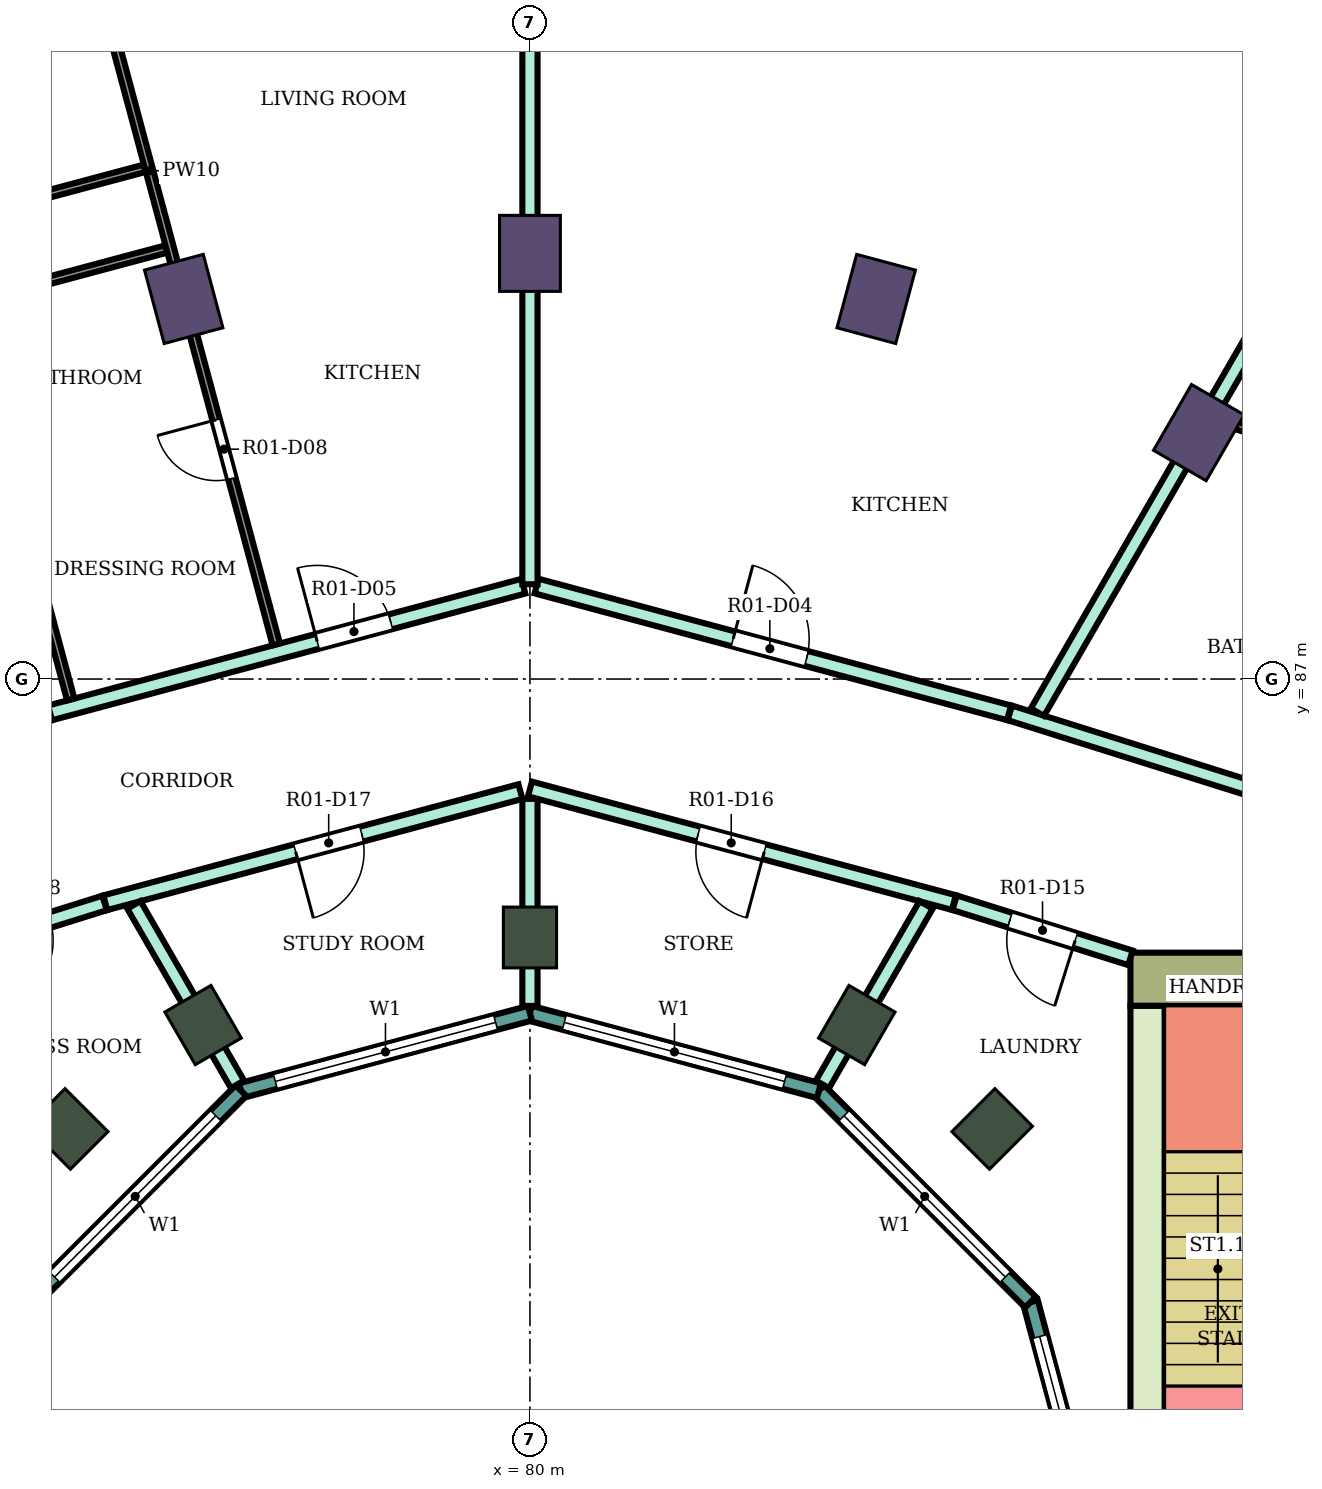
"""IFC4 building model, lengths in metres.
Left out: names, types, materials, properties, quantities, classifications, styles, units other than length and angle.
Written with IfcOpenShell. Run it as: python <this file> out.ifc"""

import sys

from ifc_helpers import new_model, si_unit, direction, frame, frame_2d, origin, origin_2d, place, context, subcontext, project, spatial, rectangle, extrude, element, fill, save


model = new_model("IFC4")
c1 = context("Model", 3, precision=1e-05, world=origin(), true_north=direction((0.0, 1.0)))
c2 = subcontext(c1, "Body", "Model", "MODEL_VIEW")
j1 = project(units=[si_unit("LENGTHUNIT", "METRE"), si_unit("PLANEANGLEUNIT", "RADIAN")], contexts=[c1])
p1 = place(None, origin())
s1 = spatial("IfcSite", under=j1, at=p1, CompositionType="ELEMENT")
p2 = place(p1, origin())
s2 = spatial("IfcBuilding", under=s1, at=p2, CompositionType="ELEMENT")
p3 = place(p2, frame((0.0, 0.0, 157.7)))
s3 = spatial("IfcBuildingStorey", under=s2, at=p3, CompositionType="ELEMENT", Elevation=157.7)
for number, where, z_axis, x_axis in (
    (1, (88.8, 90.242, 0.0), (0.0, 0.0, 1.0), (0.5, 0.866, 0.0)),
    (2, (84.555, 92.0, 0.0), (0.0, 0.0, 1.0), (0.259, 0.966, 0.0)),
    (3, (80.0, 92.6, 0.0), (0.0, 0.0, 1.0), (0.0, 1.0, 0.0)),
    (4, (75.445, 92.0, 0.0), (0.0, 0.0, 1.0), (-0.259, 0.966, 0.0)),
):
    element("IfcColumn", number, at=place(p3, frame(where, z_axis=z_axis, x_axis=x_axis)), inside=s3, PredefinedType="COLUMN", context=c2, shape_type="SweptSolid", body=[
        extrude(rectangle(XDim=1.0, YDim=0.8, at=origin_2d()), origin(), (0.0, 0.0, 1.0), 4.1),
    ])
for number, where, z_axis, x_axis in (
    (5, (86.081, 81.081, 0.0), (0.0, 0.0, 1.0), (0.707, 0.707, 0.0)),
    (6, (84.3, 82.448, 0.0), (0.0, 0.0, 1.0), (0.5, 0.866, 0.0)),
    (7, (80.0, 83.6, 0.0), (0.0, 0.0, 1.0), (0.0, 1.0, 0.0)),
    (8, (75.7, 82.448, 0.0), (0.0, 0.0, 1.0), (-0.5, 0.866, 0.0)),
    (9, (73.919, 81.081, 0.0), (0.0, 0.0, 1.0), (-0.707, 0.707, 0.0)),
):
    element("IfcColumn", number, at=place(p3, frame(where, z_axis=z_axis, x_axis=x_axis)), inside=s3, PredefinedType="COLUMN", context=c2, shape_type="SweptSolid", body=[
        extrude(rectangle(XDim=0.8, YDim=0.7, at=origin_2d()), origin(), (0.0, 0.0, 1.0), 4.1),
    ])
p4 = place(p3, frame((87.9, 83.05, 0.0), z_axis=(0.0, 0.0, 1.0), x_axis=(1.0, 0.0, 0.0)))
e10 = element("IfcWall", 10, at=p4, inside=s3, PredefinedType="SHEAR", context=c2, shape_type="SweptSolid", body=[
    extrude(rectangle(XDim=14.8, YDim=0.7, at=frame_2d((7.4, 0.0))), origin(), (0.0, 0.0, 1.0), 3.78),
])
p5 = place(p4, frame((4.2, 0.0, 0.0)))
e11 = element("IfcOpeningElement", 11, at=p5, cuts=e10, PredefinedType="OPENING", context=c2, shape_type="SweptSolid", body=[
    extrude(rectangle(XDim=2.4, YDim=2.4, at=frame_2d((1.2, 1.2))), frame((0.0, 0.36, 0.0), z_axis=(0.0, -1.0, 0.0), x_axis=(1.0, 0.0, 0.0)), (0.0, 0.0, 1.0), 0.72),
])
p6 = place(p3, frame((88.125, 75.0, 0.0), z_axis=(0.0, 0.0, 1.0), x_axis=(0.0, 1.0, 0.0)))
e12 = element("IfcWall", 12, at=p6, inside=s3, PredefinedType="SHEAR", context=c2, shape_type="SweptSolid", body=[
    extrude(rectangle(XDim=7.7, YDim=0.45, at=frame_2d((3.85, 0.0))), origin(), (0.0, 0.0, 1.0), 3.78),
])
p7 = place(p3, frame((87.604, 75.0, 0.0), z_axis=(0.0, 0.0, 1.0), x_axis=(-0.258789828301, 0.965933654434, 0.0)))
e13 = element("IfcWall", 13, at=p7, inside=s3, PredefinedType="NOTDEFINED", context=c2, shape_type="SweptSolid", body=[
    extrude(rectangle(XDim=3.936, YDim=0.2, at=frame_2d((1.968, 0.0))), origin(), (0.0, 0.0, 1.0), 4.1),
])
p8 = place(p7, frame((0.468, 0.0, 0.9)))
e14 = element("IfcOpeningElement", 14, at=p8, cuts=e13, PredefinedType="OPENING", context=c2, shape_type="SweptSolid", body=[
    extrude(rectangle(XDim=3.0, YDim=2.3, at=frame_2d((1.5, 1.15))), frame((0.0, 0.11, 0.0), z_axis=(0.0, -1.0, 0.0), x_axis=(1.0, 0.0, 0.0)), (0.0, 0.0, 1.0), 0.22),
])
p9 = place(p3, frame((86.585, 78.802, 0.0), z_axis=(0.0, 0.0, 1.0), x_axis=(-0.707106781187, 0.707106781187, 0.0)))
e15 = element("IfcWall", 15, at=p9, inside=s3, PredefinedType="NOTDEFINED", context=c2, shape_type="SweptSolid", body=[
    extrude(rectangle(XDim=3.936, YDim=0.2, at=frame_2d((1.968, 0.0))), origin(), (0.0, 0.0, 1.0), 4.1),
])
p10 = place(p9, frame((0.468, 0.0, 0.9)))
e16 = element("IfcOpeningElement", 16, at=p10, cuts=e15, PredefinedType="OPENING", context=c2, shape_type="SweptSolid", body=[
    extrude(rectangle(XDim=3.0, YDim=2.3, at=frame_2d((1.5, 1.15))), frame((0.0, 0.11, 0.0), z_axis=(0.0, -1.0, 0.0), x_axis=(1.0, 0.0, 0.0)), (0.0, 0.0, 1.0), 0.22),
])
p11 = place(p3, frame((83.802, 81.585, 0.0), z_axis=(0.0, 0.0, 1.0), x_axis=(-0.965933654434, 0.258789828301, 0.0)))
e17 = element("IfcWall", 17, at=p11, inside=s3, PredefinedType="NOTDEFINED", context=c2, shape_type="SweptSolid", body=[
    extrude(rectangle(XDim=3.936, YDim=0.2, at=frame_2d((1.968, 0.0))), origin(), (0.0, 0.0, 1.0), 4.1),
])
p12 = place(p11, frame((0.468, 0.0, 0.9)))
e18 = element("IfcOpeningElement", 18, at=p12, cuts=e17, PredefinedType="OPENING", context=c2, shape_type="SweptSolid", body=[
    extrude(rectangle(XDim=3.0, YDim=2.3, at=frame_2d((1.5, 1.15))), frame((0.0, 0.11, 0.0), z_axis=(0.0, -1.0, 0.0), x_axis=(1.0, 0.0, 0.0)), (0.0, 0.0, 1.0), 0.22),
])
p13 = place(p3, frame((80.0, 82.604, 0.0), z_axis=(0.0, 0.0, 1.0), x_axis=(-0.965933654434, -0.258789828301, 0.0)))
e19 = element("IfcWall", 19, at=p13, inside=s3, PredefinedType="NOTDEFINED", context=c2, shape_type="SweptSolid", body=[
    extrude(rectangle(XDim=3.936, YDim=0.2, at=frame_2d((1.968, 0.0))), origin(), (0.0, 0.0, 1.0), 4.1),
])
p14 = place(p13, frame((0.468, 0.0, 0.9)))
e20 = element("IfcOpeningElement", 20, at=p14, cuts=e19, PredefinedType="OPENING", context=c2, shape_type="SweptSolid", body=[
    extrude(rectangle(XDim=3.0, YDim=2.3, at=frame_2d((1.5, 1.15))), frame((0.0, 0.11, 0.0), z_axis=(0.0, -1.0, 0.0), x_axis=(1.0, 0.0, 0.0)), (0.0, 0.0, 1.0), 0.22),
])
p15 = place(p3, frame((76.198, 81.585, 0.0), z_axis=(0.0, 0.0, 1.0), x_axis=(-0.707106781187, -0.707106781187, 0.0)))
e21 = element("IfcWall", 21, at=p15, inside=s3, PredefinedType="NOTDEFINED", context=c2, shape_type="SweptSolid", body=[
    extrude(rectangle(XDim=3.936, YDim=0.2, at=frame_2d((1.968, 0.0))), origin(), (0.0, 0.0, 1.0), 4.1),
])
p16 = place(p15, frame((0.468, 0.0, 0.9)))
e22 = element("IfcOpeningElement", 22, at=p16, cuts=e21, PredefinedType="OPENING", context=c2, shape_type="SweptSolid", body=[
    extrude(rectangle(XDim=3.0, YDim=2.3, at=frame_2d((1.5, 1.15))), frame((0.0, 0.11, 0.0), z_axis=(0.0, -1.0, 0.0), x_axis=(1.0, 0.0, 0.0)), (0.0, 0.0, 1.0), 0.22),
])
p17 = place(p3, frame((72.1, 83.332, 0.0), z_axis=(0.0, 0.0, 1.0), x_axis=(0.954233106619, 0.299063836383, 0.0)))
e23 = element("IfcWall", 23, at=p17, inside=s3, PredefinedType="PARTITIONING", context=c2, shape_type="SweptSolid", body=[
    extrude(rectangle(XDim=2.414, YDim=0.2, at=frame_2d((1.207, 0.0))), origin(), (0.0, 0.0, 1.0), 3.65),
])
p18 = place(p17, frame((0.762, 0.0, 0.0)))
e24 = element("IfcOpeningElement", 24, at=p18, cuts=e23, PredefinedType="OPENING", context=c2, shape_type="SweptSolid", body=[
    extrude(rectangle(XDim=0.9, YDim=2.1, at=frame_2d((0.45, 1.05))), frame((0.0, 0.11, 0.0), z_axis=(0.0, -1.0, 0.0), x_axis=(1.0, 0.0, 0.0)), (0.0, 0.0, 1.0), 0.22),
])
p19 = place(p3, frame((73.687, 86.554, 0.0), z_axis=(0.0, 0.0, 1.0), x_axis=(0.965999420828, 0.258544230182, 0.0)))
e25 = element("IfcWall", 25, at=p19, inside=s3, PredefinedType="PARTITIONING", context=c2, shape_type="SweptSolid", body=[
    extrude(rectangle(XDim=6.446, YDim=0.2, at=frame_2d((3.223, 0.0))), origin(), (0.0, 0.0, 1.0), 3.65),
])
p20 = place(p19, frame((3.638, 0.0, 0.0)))
e26 = element("IfcOpeningElement", 26, at=p20, cuts=e25, PredefinedType="OPENING", context=c2, shape_type="SweptSolid", body=[
    extrude(rectangle(XDim=1.0, YDim=2.1, at=frame_2d((0.5, 1.05))), frame((0.0, 0.11, 0.0), z_axis=(0.0, -1.0, 0.0), x_axis=(1.0, 0.0, 0.0)), (0.0, 0.0, 1.0), 0.22),
])
p21 = place(p3, frame((74.413, 84.057, 0.0), z_axis=(0.0, 0.0, 1.0), x_axis=(0.965972135939, 0.258646153246, 0.0)))
e27 = element("IfcWall", 27, at=p21, inside=s3, PredefinedType="PARTITIONING", context=c2, shape_type="SweptSolid", body=[
    extrude(rectangle(XDim=5.654, YDim=0.2, at=frame_2d((2.827, 0.0))), origin(), (0.0, 0.0, 1.0), 3.65),
])
p22 = place(p21, frame((2.593, 0.0, 0.0)))
e28 = element("IfcOpeningElement", 28, at=p22, cuts=e27, PredefinedType="OPENING", context=c2, shape_type="SweptSolid", body=[
    extrude(rectangle(XDim=0.9, YDim=2.1, at=frame_2d((0.45, 1.05))), frame((0.0, 0.11, 0.0), z_axis=(0.0, -1.0, 0.0), x_axis=(1.0, 0.0, 0.0)), (0.0, 0.0, 1.0), 0.22),
])
p23 = place(p3, frame((74.79, 84.028, 0.0), z_axis=(0.0, 0.0, 1.0), x_axis=(0.499905962189, -0.866079689733, 0.0)))
e29 = element("IfcWall", 29, at=p23, inside=s3, PredefinedType="PARTITIONING", context=c2, shape_type="SweptSolid", body=[
    extrude(rectangle(XDim=2.726, YDim=0.2, at=frame_2d((1.363, 0.0))), origin(), (0.0, 0.0, 1.0), 3.65),
])
p24 = place(p3, frame((80.0, 82.699, 0.0), z_axis=(0.0, 0.0, 1.0), x_axis=(0.0, 1.0, 0.0)))
e30 = element("IfcWall", 30, at=p24, inside=s3, PredefinedType="PARTITIONING", context=c2, shape_type="SweptSolid", body=[
    extrude(rectangle(XDim=2.725, YDim=0.2, at=frame_2d((1.363, 0.0))), origin(), (0.0, 0.0, 1.0), 3.65),
])
p25 = place(p3, frame((80.0, 85.554, 0.0), z_axis=(0.0, 0.0, 1.0), x_axis=(0.965928989968, -0.258807237802, 0.0)))
e31 = element("IfcWall", 31, at=p25, inside=s3, PredefinedType="PARTITIONING", context=c2, shape_type="SweptSolid", body=[
    extrude(rectangle(XDim=5.774, YDim=0.2, at=frame_2d((2.887, 0.0))), origin(), (0.0, 0.0, 1.0), 3.65),
])
p26 = place(p25, frame((2.292, 0.0, 0.0)))
e32 = element("IfcOpeningElement", 32, at=p26, cuts=e31, PredefinedType="OPENING", context=c2, shape_type="SweptSolid", body=[
    extrude(rectangle(XDim=0.9, YDim=2.1, at=frame_2d((0.45, 1.05))), frame((0.0, 0.11, 0.0), z_axis=(0.0, -1.0, 0.0), x_axis=(1.0, 0.0, 0.0)), (0.0, 0.0, 1.0), 0.22),
])
p27 = place(p3, frame((80.087, 88.223, 0.0), z_axis=(0.0, 0.0, 1.0), x_axis=(0.965852330757, -0.25909317855, 0.0)))
e33 = element("IfcWall", 33, at=p27, inside=s3, PredefinedType="PARTITIONING", context=c2, shape_type="SweptSolid", body=[
    extrude(rectangle(XDim=6.436, YDim=0.2, at=frame_2d((3.218, 0.0))), origin(), (0.0, 0.0, 1.0), 3.65),
])
p28 = place(p27, frame((2.678, 0.0, 0.0)))
e34 = element("IfcOpeningElement", 34, at=p28, cuts=e33, PredefinedType="OPENING", context=c2, shape_type="SweptSolid", body=[
    extrude(rectangle(XDim=1.0, YDim=2.1, at=frame_2d((0.5, 1.05))), frame((0.0, 0.11, 0.0), z_axis=(0.0, -1.0, 0.0), x_axis=(1.0, 0.0, 0.0)), (0.0, 0.0, 1.0), 0.22),
])
p29 = place(p3, frame((80.0, 88.247, 0.0), z_axis=(0.0, 0.0, 1.0), x_axis=(0.0, 1.0, 0.0)))
e35 = element("IfcWall", 35, at=p29, inside=s3, PredefinedType="PARTITIONING", context=c2, shape_type="SweptSolid", body=[
    extrude(rectangle(XDim=9.952, YDim=0.2, at=frame_2d((4.976, 0.0))), origin(), (0.0, 0.0, 1.0), 3.65),
])
p30 = place(p3, frame((83.848, 81.667, 0.0), z_axis=(0.0, 0.0, 1.0), x_axis=(0.500185068774, 0.865918527909, 0.0)))
e36 = element("IfcWall", 36, at=p30, inside=s3, PredefinedType="PARTITIONING", context=c2, shape_type="SweptSolid", body=[
    extrude(rectangle(XDim=2.726, YDim=0.2, at=frame_2d((1.363, 0.0))), origin(), (0.0, 0.0, 1.0), 3.65),
])
p31 = place(p3, frame((85.587, 84.057, 0.0), z_axis=(0.0, 0.0, 1.0), x_axis=(0.954239513179, -0.299043393987, 0.0)))
e37 = element("IfcWall", 37, at=p31, inside=s3, PredefinedType="PARTITIONING", context=c2, shape_type="SweptSolid", body=[
    extrude(rectangle(XDim=2.424, YDim=0.2, at=frame_2d((1.212, 0.0))), origin(), (0.0, 0.0, 1.0), 3.65),
])
p32 = place(p31, frame((0.762, 0.0, 0.0)))
e38 = element("IfcOpeningElement", 38, at=p32, cuts=e37, PredefinedType="OPENING", context=c2, shape_type="SweptSolid", body=[
    extrude(rectangle(XDim=0.9, YDim=2.1, at=frame_2d((0.45, 1.05))), frame((0.0, 0.11, 0.0), z_axis=(0.0, -1.0, 0.0), x_axis=(1.0, 0.0, 0.0)), (0.0, 0.0, 1.0), 0.22),
])
p33 = place(p3, frame((86.313, 86.555, 0.0), z_axis=(0.0, 0.0, 1.0), x_axis=(0.953919398959, -0.300062960544, 0.0)))
e39 = element("IfcWall", 39, at=p33, inside=s3, PredefinedType="PARTITIONING", context=c2, shape_type="SweptSolid", body=[
    extrude(rectangle(XDim=5.721, YDim=0.2, at=frame_2d((2.86, 0.0))), origin(), (0.0, 0.0, 1.0), 3.65),
])
p34 = place(p3, frame((86.677, 86.564, 0.0), z_axis=(0.0, 0.0, 1.0), x_axis=(0.500120377296, 0.865955892764, 0.0)))
e40 = element("IfcWall", 40, at=p34, inside=s3, PredefinedType="PARTITIONING", context=c2, shape_type="SweptSolid", body=[
    extrude(rectangle(XDim=12.445, YDim=0.2, at=frame_2d((6.222, 0.0))), origin(), (0.0, 0.0, 1.0), 3.65),
])
p35 = place(p3, frame((70.019, 92.405, 0.0), z_axis=(0.0, 0.0, 1.0), x_axis=(0.965982744428, 0.258606530209, 0.0)))
e41 = element("IfcWall", 41, at=p35, inside=s3, PredefinedType="PARTITIONING", context=c2, shape_type="SweptSolid", body=[
    extrude(rectangle(XDim=5.087, YDim=0.1, at=frame_2d((2.543, 0.0))), origin(), (0.0, 0.0, 1.0), 3.65),
])
p36 = place(p35, frame((2.438, 0.0, 0.0)))
e42 = element("IfcOpeningElement", 42, at=p36, cuts=e41, PredefinedType="OPENING", context=c2, shape_type="SweptSolid", body=[
    extrude(rectangle(XDim=0.8, YDim=2.1, at=frame_2d((0.4, 1.05))), frame((0.0, 0.06, 0.0), z_axis=(0.0, -1.0, 0.0), x_axis=(1.0, 0.0, 0.0)), (0.0, 0.0, 1.0), 0.12),
])
p37 = place(p3, frame((72.574, 91.898, 0.0), z_axis=(0.0, 0.0, 1.0), x_axis=(0.258739127054, -0.965947236722, 0.0)))
e43 = element("IfcWall", 43, at=p37, inside=s3, PredefinedType="PARTITIONING", context=c2, shape_type="SweptSolid", body=[
    extrude(rectangle(XDim=5.349, YDim=0.1, at=frame_2d((2.675, 0.0))), origin(), (0.0, 0.0, 1.0), 3.65),
])
p38 = place(p3, frame((72.561, 91.946, 0.0), z_axis=(0.0, 0.0, 1.0), x_axis=(0.96591000446, 0.258878085754, 0.0)))
e44 = element("IfcWall", 44, at=p38, inside=s3, PredefinedType="PARTITIONING", context=c2, shape_type="SweptSolid", body=[
    extrude(rectangle(XDim=2.75, YDim=0.1, at=frame_2d((1.375, 0.0))), origin(), (0.0, 0.0, 1.0), 3.65),
])
p39 = place(p3, frame((73.324, 99.92, 0.0), z_axis=(0.0, 0.0, 1.0), x_axis=(0.258710550884, -0.965954890697, 0.0)))
e45 = element("IfcWall", 45, at=p39, inside=s3, PredefinedType="PARTITIONING", context=c2, shape_type="SweptSolid", body=[
    extrude(rectangle(XDim=12.904, YDim=0.1, at=frame_2d((6.452, 0.0))), origin(), (0.0, 0.0, 1.0), 3.65),
])
p40 = place(p39, frame((2.787, 0.0, 0.0)))
e46 = element("IfcOpeningElement", 46, at=p40, cuts=e45, PredefinedType="OPENING", context=c2, shape_type="SweptSolid", body=[
    extrude(rectangle(XDim=0.9, YDim=2.1, at=frame_2d((0.45, 1.05))), frame((0.0, 0.06, 0.0), z_axis=(0.0, -1.0, 0.0), x_axis=(1.0, 0.0, 0.0)), (0.0, 0.0, 1.0), 0.12),
])
p41 = place(p39, frame((9.844, 0.0, 0.0)))
e47 = element("IfcOpeningElement", 47, at=p41, cuts=e45, PredefinedType="OPENING", context=c2, shape_type="SweptSolid", body=[
    extrude(rectangle(XDim=0.8, YDim=2.1, at=frame_2d((0.4, 1.05))), frame((0.0, 0.06, 0.0), z_axis=(0.0, -1.0, 0.0), x_axis=(1.0, 0.0, 0.0)), (0.0, 0.0, 1.0), 0.12),
])
p42 = place(p3, frame((89.026, 90.419, 0.0), z_axis=(0.0, 0.0, 1.0), x_axis=(0.954207609901, -0.299145177475, 0.0)))
e48 = element("IfcWall", 48, at=p42, inside=s3, PredefinedType="PARTITIONING", context=c2, shape_type="SweptSolid", body=[
    extrude(rectangle(XDim=5.031, YDim=0.1, at=frame_2d((2.516, 0.0))), origin(), (0.0, 0.0, 1.0), 3.65),
])
p43 = place(p8, origin())
e49 = element("IfcWindow", 49, at=p43, inside=s3, PartitioningType="SINGLE_PANEL", PredefinedType="WINDOW", context=c2, shape_type="SweptSolid", body=[
    extrude(rectangle(XDim=3.0, YDim=2.3, at=frame_2d((1.5, 1.15))), frame((0.0, 0.03, 0.0), z_axis=(0.0, -1.0, 0.0), x_axis=(1.0, 0.0, 0.0)), (0.0, 0.0, 1.0), 0.06),
])
fill(e14, e49)
p44 = place(p10, origin())
e50 = element("IfcWindow", 50, at=p44, inside=s3, PartitioningType="SINGLE_PANEL", PredefinedType="WINDOW", context=c2, shape_type="SweptSolid", body=[
    extrude(rectangle(XDim=3.0, YDim=2.3, at=frame_2d((1.5, 1.15))), frame((0.0, 0.03, 0.0), z_axis=(0.0, -1.0, 0.0), x_axis=(1.0, 0.0, 0.0)), (0.0, 0.0, 1.0), 0.06),
])
fill(e16, e50)
p45 = place(p12, origin())
e51 = element("IfcWindow", 51, at=p45, inside=s3, PartitioningType="SINGLE_PANEL", PredefinedType="WINDOW", context=c2, shape_type="SweptSolid", body=[
    extrude(rectangle(XDim=3.0, YDim=2.3, at=frame_2d((1.5, 1.15))), frame((0.0, 0.03, 0.0), z_axis=(0.0, -1.0, 0.0), x_axis=(1.0, 0.0, 0.0)), (0.0, 0.0, 1.0), 0.06),
])
fill(e18, e51)
p46 = place(p14, origin())
e52 = element("IfcWindow", 52, at=p46, inside=s3, PartitioningType="SINGLE_PANEL", PredefinedType="WINDOW", context=c2, shape_type="SweptSolid", body=[
    extrude(rectangle(XDim=3.0, YDim=2.3, at=frame_2d((1.5, 1.15))), frame((0.0, 0.03, 0.0), z_axis=(0.0, -1.0, 0.0), x_axis=(1.0, 0.0, 0.0)), (0.0, 0.0, 1.0), 0.06),
])
fill(e20, e52)
p47 = place(p16, origin())
e53 = element("IfcWindow", 53, at=p47, inside=s3, PartitioningType="SINGLE_PANEL", PredefinedType="WINDOW", context=c2, shape_type="SweptSolid", body=[
    extrude(rectangle(XDim=3.0, YDim=2.3, at=frame_2d((1.5, 1.15))), frame((0.0, 0.03, 0.0), z_axis=(0.0, -1.0, 0.0), x_axis=(1.0, 0.0, 0.0)), (0.0, 0.0, 1.0), 0.06),
])
fill(e22, e53)
p48 = place(p28, origin())
e54 = element("IfcDoor", 54, at=p48, inside=s3, OperationType="SINGLE_SWING_LEFT", PredefinedType="DOOR", context=c2, shape_type="SweptSolid", body=[
    extrude(rectangle(XDim=1.0, YDim=2.1, at=frame_2d((0.5, 1.05))), frame((0.0, 0.025, 0.0), z_axis=(0.0, -1.0, 0.0), x_axis=(1.0, 0.0, 0.0)), (0.0, 0.0, 1.0), 0.05),
])
fill(e34, e54)
p49 = place(p20, origin())
e55 = element("IfcDoor", 55, at=p49, inside=s3, OperationType="SINGLE_SWING_LEFT", PredefinedType="DOOR", context=c2, shape_type="SweptSolid", body=[
    extrude(rectangle(XDim=1.0, YDim=2.1, at=frame_2d((0.5, 1.05))), frame((0.0, 0.025, 0.0), z_axis=(0.0, -1.0, 0.0), x_axis=(1.0, 0.0, 0.0)), (0.0, 0.0, 1.0), 0.05),
])
fill(e26, e55)
p50 = place(p41, frame((0.8, 0.0, 0.0), z_axis=(0.0, 0.0, 1.0), x_axis=(-1.0, 0.0, 0.0)))
e56 = element("IfcDoor", 56, at=p50, inside=s3, OperationType="SINGLE_SWING_RIGHT", PredefinedType="DOOR", context=c2, shape_type="SweptSolid", body=[
    extrude(rectangle(XDim=0.8, YDim=2.1, at=frame_2d((0.4, 1.05))), frame((0.0, 0.025, 0.0), z_axis=(0.0, -1.0, 0.0), x_axis=(1.0, 0.0, 0.0)), (0.0, 0.0, 1.0), 0.05),
])
fill(e47, e56)
p51 = place(p32, frame((0.9, 0.0, 0.0), z_axis=(0.0, 0.0, 1.0), x_axis=(-1.0, 0.0, 0.0)))
e57 = element("IfcDoor", 57, at=p51, inside=s3, OperationType="SINGLE_SWING_LEFT", PredefinedType="DOOR", context=c2, shape_type="SweptSolid", body=[
    extrude(rectangle(XDim=0.9, YDim=2.1, at=frame_2d((0.45, 1.05))), frame((0.0, 0.025, 0.0), z_axis=(0.0, -1.0, 0.0), x_axis=(1.0, 0.0, 0.0)), (0.0, 0.0, 1.0), 0.05),
])
fill(e38, e57)
p52 = place(p26, frame((0.9, 0.0, 0.0), z_axis=(0.0, 0.0, 1.0), x_axis=(-1.0, 0.0, 0.0)))
e58 = element("IfcDoor", 58, at=p52, inside=s3, OperationType="SINGLE_SWING_LEFT", PredefinedType="DOOR", context=c2, shape_type="SweptSolid", body=[
    extrude(rectangle(XDim=0.9, YDim=2.1, at=frame_2d((0.45, 1.05))), frame((0.0, 0.025, 0.0), z_axis=(0.0, -1.0, 0.0), x_axis=(1.0, 0.0, 0.0)), (0.0, 0.0, 1.0), 0.05),
])
fill(e32, e58)
p53 = place(p22, frame((0.9, 0.0, 0.0), z_axis=(0.0, 0.0, 1.0), x_axis=(-1.0, 0.0, 0.0)))
e59 = element("IfcDoor", 59, at=p53, inside=s3, OperationType="SINGLE_SWING_RIGHT", PredefinedType="DOOR", context=c2, shape_type="SweptSolid", body=[
    extrude(rectangle(XDim=0.9, YDim=2.1, at=frame_2d((0.45, 1.05))), frame((0.0, 0.025, 0.0), z_axis=(0.0, -1.0, 0.0), x_axis=(1.0, 0.0, 0.0)), (0.0, 0.0, 1.0), 0.05),
])
fill(e28, e59)
save(model, sys.argv[1])
